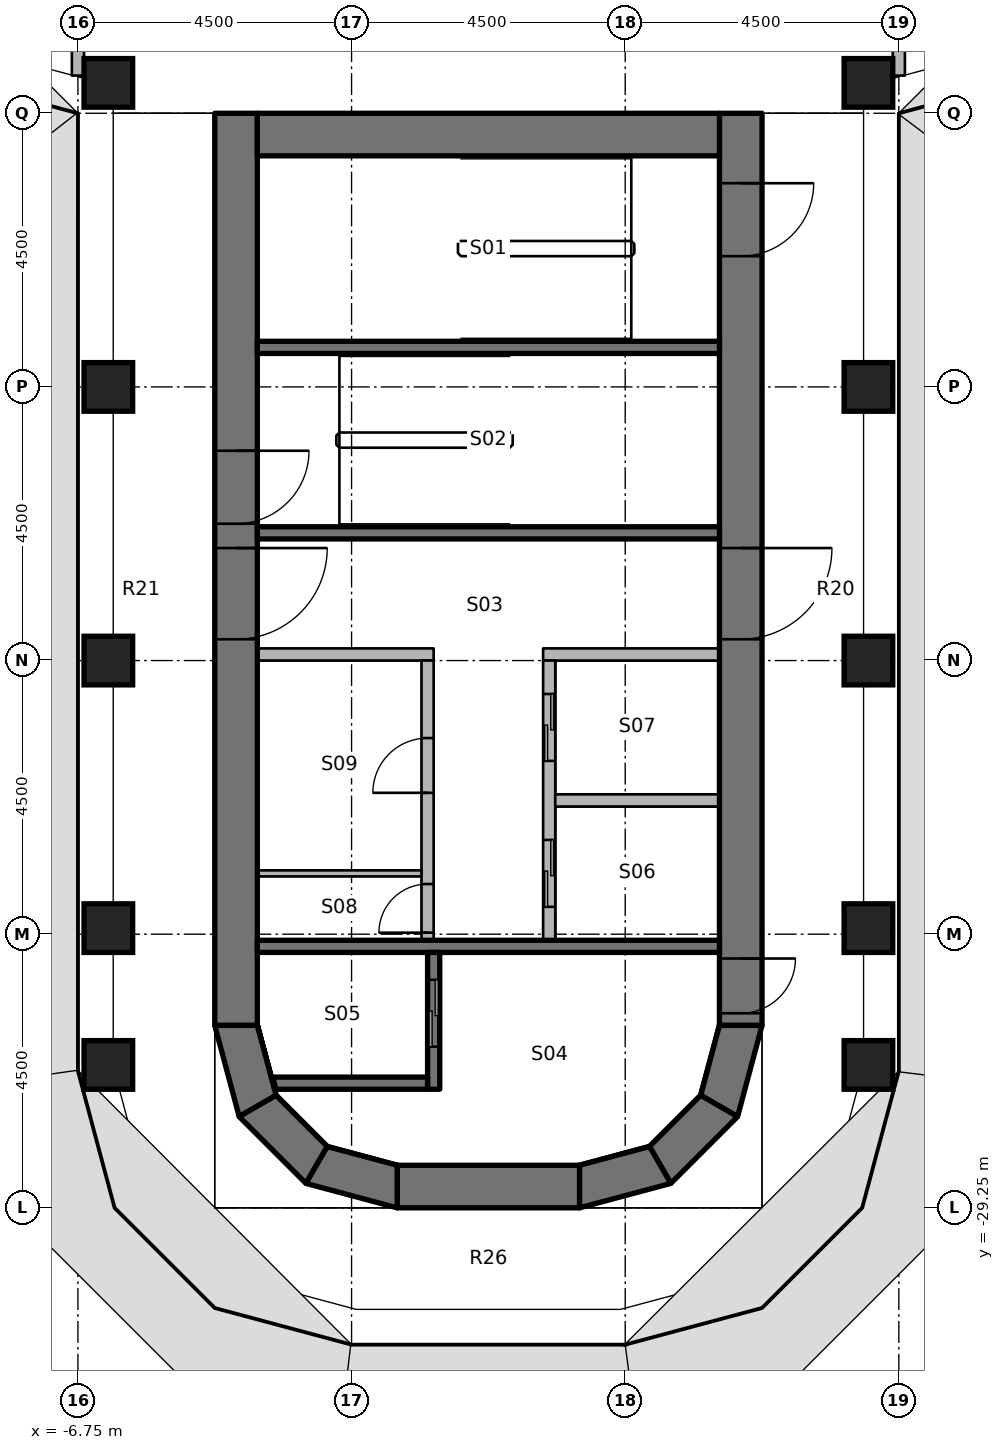
"""IFC4 building model, lengths in metres.
Left out: names, types, materials, properties, quantities, classifications, styles, units other than length and angle.
Written with IfcOpenShell. Run it as: python <this file> out.ifc"""

import sys

from ifc_helpers import new_model, si_unit, direction, frame, frame_2d, origin, origin_2d, place, context, subcontext, project, spatial, polyline, rectangle, outline, extrude, element, fill, save


model = new_model("IFC4")
c1 = context("Model", 3, precision=1e-05, world=origin(), true_north=direction((0.0, 1.0)))
c2 = subcontext(c1, "Body", "Model", "MODEL_VIEW")
j1 = project(units=[si_unit("LENGTHUNIT", "METRE"), si_unit("PLANEANGLEUNIT", "RADIAN")], contexts=[c1])
p1 = place(None, origin())
s1 = spatial("IfcSite", under=j1, at=p1, CompositionType="ELEMENT")
p2 = place(p1, origin())
s2 = spatial("IfcBuilding", under=s1, at=p2, CompositionType="ELEMENT")
p3 = place(p2, frame((0.0, 0.0, 179.0)))
s3 = spatial("IfcBuildingStorey", under=s2, at=p3, CompositionType="ELEMENT", Elevation=179.0)
for number, where, z_axis, x_axis in (
    (1, (-6.25, -26.9, 0.0), (0.0, 0.0, 1.0), (1.0, 0.0, 0.0)),
    (2, (-6.25, -24.65, 0.0), (0.0, 0.0, 1.0), (1.0, 0.0, 0.0)),
    (3, (-6.25, -20.25, 0.0), (0.0, 0.0, 1.0), (1.0, 0.0, 0.0)),
    (4, (-6.25, -15.75, 0.0), (0.0, 0.0, 1.0), (1.0, 0.0, 0.0)),
    (5, (-6.25, -10.75, 0.0), (0.0, 0.0, 1.0), (1.0, 0.0, 0.0)),
    (6, (6.25, -26.9, 0.0), (0.0, 0.0, 1.0), (1.0, 0.0, 0.0)),
    (7, (6.25, -24.65, 0.0), (0.0, 0.0, 1.0), (1.0, 0.0, 0.0)),
    (8, (6.25, -20.25, 0.0), (0.0, 0.0, 1.0), (1.0, 0.0, 0.0)),
    (9, (6.25, -15.75, 0.0), (0.0, 0.0, 1.0), (1.0, 0.0, 0.0)),
    (10, (6.25, -10.75, 0.0), (0.0, 0.0, 1.0), (1.0, 0.0, 0.0)),
):
    element("IfcColumn", number, at=place(p3, frame(where, z_axis=z_axis, x_axis=x_axis)), inside=s3, PredefinedType="COLUMN", context=c2, shape_type="SweptSolid", body=[
        extrude(rectangle(XDim=0.8, YDim=0.8, at=origin_2d()), origin(), (0.0, 0.0, 1.0), 3.65),
    ])
p4 = place(p3, frame((-4.15, -11.25, 0.0), z_axis=(0.0, 0.0, 1.0), x_axis=(0.0, -1.0, 0.0)))
e11 = element("IfcWall", 11, at=p4, inside=s3, PredefinedType="SHEAR", context=c2, shape_type="SweptSolid", body=[
    extrude(rectangle(XDim=15.0, YDim=0.7, at=frame_2d((7.5, 0.0))), origin(), (0.0, 0.0, 1.0), 3.8),
])
p5 = place(p4, frame((7.15, 0.0, 0.0)))
e12 = element("IfcOpeningElement", 12, at=p5, cuts=e11, PredefinedType="OPENING", context=c2, shape_type="SweptSolid", body=[
    extrude(rectangle(XDim=1.5, YDim=2.3, at=frame_2d((0.75, 1.15))), frame((0.0, 0.36, 0.0), z_axis=(0.0, -1.0, 0.0), x_axis=(1.0, 0.0, 0.0)), (0.0, 0.0, 1.0), 0.72),
])
p6 = place(p4, frame((5.55, 0.0, 0.0)))
e13 = element("IfcOpeningElement", 13, at=p6, cuts=e11, PredefinedType="OPENING", context=c2, shape_type="SweptSolid", body=[
    extrude(rectangle(XDim=1.2, YDim=2.1, at=frame_2d((0.6, 1.05))), frame((0.0, 0.36, 0.0), z_axis=(0.0, -1.0, 0.0), x_axis=(1.0, 0.0, 0.0)), (0.0, 0.0, 1.0), 0.72),
])
p7 = place(p3, frame((4.15, -11.25, 0.0), z_axis=(0.0, 0.0, 1.0), x_axis=(0.0, -1.0, 0.0)))
e14 = element("IfcWall", 14, at=p7, inside=s3, PredefinedType="SHEAR", context=c2, shape_type="SweptSolid", body=[
    extrude(rectangle(XDim=15.0, YDim=0.7, at=frame_2d((7.5, 0.0))), origin(), (0.0, 0.0, 1.0), 3.8),
])
p8 = place(p7, frame((7.15, 0.0, 0.0)))
e15 = element("IfcOpeningElement", 15, at=p8, cuts=e14, PredefinedType="OPENING", context=c2, shape_type="SweptSolid", body=[
    extrude(rectangle(XDim=1.5, YDim=2.3, at=frame_2d((0.75, 1.15))), frame((0.0, 0.36, 0.0), z_axis=(0.0, -1.0, 0.0), x_axis=(1.0, 0.0, 0.0)), (0.0, 0.0, 1.0), 0.72),
])
p9 = place(p7, frame((13.9, 0.0, 0.0)))
e16 = element("IfcOpeningElement", 16, at=p9, cuts=e14, PredefinedType="OPENING", context=c2, shape_type="SweptSolid", body=[
    extrude(rectangle(XDim=0.9, YDim=2.1, at=frame_2d((0.45, 1.05))), frame((0.0, 0.36, 0.0), z_axis=(0.0, -1.0, 0.0), x_axis=(1.0, 0.0, 0.0)), (0.0, 0.0, 1.0), 0.72),
])
p10 = place(p7, frame((1.15, 0.0, 0.0)))
e17 = element("IfcOpeningElement", 17, at=p10, cuts=e14, PredefinedType="OPENING", context=c2, shape_type="SweptSolid", body=[
    extrude(rectangle(XDim=1.2, YDim=2.1, at=frame_2d((0.6, 1.05))), frame((0.0, 0.36, 0.0), z_axis=(0.0, -1.0, 0.0), x_axis=(1.0, 0.0, 0.0)), (0.0, 0.0, 1.0), 0.72),
])
p11 = place(p3, frame((-3.8, -11.6, 0.0), z_axis=(0.0, 0.0, 1.0), x_axis=(1.0, 0.0, 0.0)))
e18 = element("IfcWall", 18, at=p11, inside=s3, PredefinedType="SHEAR", context=c2, shape_type="SweptSolid", body=[
    extrude(rectangle(XDim=7.6, YDim=0.7, at=frame_2d((3.8, 0.0))), origin(), (0.0, 0.0, 1.0), 3.8),
])
p12 = place(p3, frame((-1.5, -28.9, 0.0), z_axis=(0.0, 0.0, 1.0), x_axis=(1.0, 0.0, 0.0)))
e19 = element("IfcWall", 19, at=p12, inside=s3, PredefinedType="SHEAR", context=c2, shape_type="SweptSolid", body=[
    extrude(rectangle(XDim=3.0, YDim=0.7, at=frame_2d((1.5, 0.0))), origin(), (0.0, 0.0, 1.0), 3.8),
])
p13 = place(p3, origin())
e20 = element("IfcWall", 20, at=p13, inside=s3, PredefinedType="SHEAR", context=c2, shape_type="SweptSolid", body=[
    extrude(outline(polyline([(-4.5, -26.25), (-4.098, -27.75), (-3.492, -27.4), (-3.8, -26.25), (-4.5, -26.25)])), origin(), (0.0, 0.0, 1.0), 3.8),
])
p14 = place(p3, origin())
e21 = element("IfcWall", 21, at=p14, inside=s3, PredefinedType="SHEAR", context=c2, shape_type="SweptSolid", body=[
    extrude(outline(polyline([(-4.098, -27.75), (-3.0, -28.848), (-2.65, -28.242), (-3.492, -27.4), (-4.098, -27.75)])), origin(), (0.0, 0.0, 1.0), 3.8),
])
p15 = place(p3, origin())
e22 = element("IfcWall", 22, at=p15, inside=s3, PredefinedType="SHEAR", context=c2, shape_type="SweptSolid", body=[
    extrude(outline(polyline([(-3.0, -28.848), (-1.5, -29.25), (-1.5, -28.55), (-2.65, -28.242), (-3.0, -28.848)])), origin(), (0.0, 0.0, 1.0), 3.8),
])
p16 = place(p3, origin())
e23 = element("IfcWall", 23, at=p16, inside=s3, PredefinedType="SHEAR", context=c2, shape_type="SweptSolid", body=[
    extrude(outline(polyline([(4.5, -26.25), (4.098, -27.75), (3.492, -27.4), (3.8, -26.25), (4.5, -26.25)])), origin(), (0.0, 0.0, 1.0), 3.8),
])
p17 = place(p3, origin())
e24 = element("IfcWall", 24, at=p17, inside=s3, PredefinedType="SHEAR", context=c2, shape_type="SweptSolid", body=[
    extrude(outline(polyline([(4.098, -27.75), (3.0, -28.848), (2.65, -28.242), (3.492, -27.4), (4.098, -27.75)])), origin(), (0.0, 0.0, 1.0), 3.8),
])
p18 = place(p3, origin())
e25 = element("IfcWall", 25, at=p18, inside=s3, PredefinedType="SHEAR", context=c2, shape_type="SweptSolid", body=[
    extrude(outline(polyline([(3.0, -28.848), (1.5, -29.25), (1.5, -28.55), (2.65, -28.242), (3.0, -28.848)])), origin(), (0.0, 0.0, 1.0), 3.8),
])
p19 = place(p3, frame((3.8, -24.95, 0.0), z_axis=(0.0, 0.0, 1.0), x_axis=(-1.0, 0.0, 0.0)))
e26 = element("IfcWall", 26, at=p19, inside=s3, PredefinedType="SHEAR", context=c2, shape_type="SweptSolid", body=[
    extrude(rectangle(XDim=7.6, YDim=0.2, at=frame_2d((3.8, 0.0))), origin(), (0.0, 0.0, 1.0), 3.65),
])
p20 = place(p3, frame((-0.9, -27.3, 0.0), z_axis=(0.0, 0.0, 1.0), x_axis=(0.0, 1.0, 0.0)))
e27 = element("IfcWall", 27, at=p20, inside=s3, PredefinedType="SHEAR", context=c2, shape_type="SweptSolid", body=[
    extrude(rectangle(XDim=2.25, YDim=0.2, at=frame_2d((1.125, 0.0))), origin(), (0.0, 0.0, 1.0), 3.65),
])
p21 = place(p20, frame((0.7, 0.0, 0.0)))
e28 = element("IfcOpeningElement", 28, at=p21, cuts=e27, PredefinedType="OPENING", context=c2, shape_type="SweptSolid", body=[
    extrude(rectangle(XDim=1.1, YDim=2.3, at=frame_2d((0.55, 1.15))), frame((0.0, 0.11, 0.0), z_axis=(0.0, -1.0, 0.0), x_axis=(1.0, 0.0, 0.0)), (0.0, 0.0, 1.0), 0.22),
])
p22 = place(p3, origin())
e29 = element("IfcWall", 29, at=p22, inside=s3, PredefinedType="SHEAR", context=c2, shape_type="SweptSolid", body=[
    extrude(outline(polyline([(-1.0, -27.1), (-3.548, -27.1), (-3.494, -27.3), (-1.0, -27.3), (-1.0, -27.1)])), origin(), (0.0, 0.0, 1.0), 3.65),
])
for number, where, z_axis, x_axis in (
    (30, (3.8, -18.15, 0.0), (0.0, 0.0, 1.0), (-1.0, 0.0, 0.0)),
    (31, (3.8, -15.1, 0.0), (0.0, 0.0, 1.0), (-1.0, 0.0, 0.0)),
):
    element("IfcWall", number, at=place(p3, frame(where, z_axis=z_axis, x_axis=x_axis)), inside=s3, PredefinedType="SHEAR", context=c2, shape_type="SweptSolid", body=[
        extrude(rectangle(XDim=7.6, YDim=0.2, at=frame_2d((3.8, 0.0))), origin(), (0.0, 0.0, 1.0), 3.65),
    ])
p23 = place(p3, frame((3.8, -20.15, 0.0), z_axis=(0.0, 0.0, 1.0), x_axis=(-1.0, 0.0, 0.0)))
e32 = element("IfcWall", 32, at=p23, inside=s3, PredefinedType="PARTITIONING", context=c2, shape_type="SweptSolid", body=[
    extrude(rectangle(XDim=2.9, YDim=0.2, at=frame_2d((1.45, 0.0))), origin(), (0.0, 0.0, 1.0), 3.65),
])
p24 = place(p3, frame((1.0, -24.85, 0.0), z_axis=(0.0, 0.0, 1.0), x_axis=(0.0, 1.0, 0.0)))
e33 = element("IfcWall", 33, at=p24, inside=s3, PredefinedType="PARTITIONING", context=c2, shape_type="SweptSolid", body=[
    extrude(rectangle(XDim=4.6, YDim=0.2, at=frame_2d((2.3, 0.0))), origin(), (0.0, 0.0, 1.0), 3.65),
])
p25 = place(p24, frame((0.55, 0.0, 0.0)))
e34 = element("IfcOpeningElement", 34, at=p25, cuts=e33, PredefinedType="OPENING", context=c2, shape_type="SweptSolid", body=[
    extrude(rectangle(XDim=1.1, YDim=2.3, at=frame_2d((0.55, 1.15))), frame((0.0, 0.11, 0.0), z_axis=(0.0, -1.0, 0.0), x_axis=(1.0, 0.0, 0.0)), (0.0, 0.0, 1.0), 0.22),
])
p26 = place(p24, frame((2.95, 0.0, 0.0)))
e35 = element("IfcOpeningElement", 35, at=p26, cuts=e33, PredefinedType="OPENING", context=c2, shape_type="SweptSolid", body=[
    extrude(rectangle(XDim=1.1, YDim=2.3, at=frame_2d((0.55, 1.15))), frame((0.0, 0.11, 0.0), z_axis=(0.0, -1.0, 0.0), x_axis=(1.0, 0.0, 0.0)), (0.0, 0.0, 1.0), 0.22),
])
p27 = place(p3, frame((-0.9, -20.15, 0.0), z_axis=(0.0, 0.0, 1.0), x_axis=(-1.0, 0.0, 0.0)))
e36 = element("IfcWall", 36, at=p27, inside=s3, PredefinedType="PARTITIONING", context=c2, shape_type="SweptSolid", body=[
    extrude(rectangle(XDim=2.9, YDim=0.2, at=frame_2d((1.45, 0.0))), origin(), (0.0, 0.0, 1.0), 3.65),
])
p28 = place(p3, frame((-1.0, -24.85, 0.0), z_axis=(0.0, 0.0, 1.0), x_axis=(0.0, 1.0, 0.0)))
e37 = element("IfcWall", 37, at=p28, inside=s3, PredefinedType="PARTITIONING", context=c2, shape_type="SweptSolid", body=[
    extrude(rectangle(XDim=4.6, YDim=0.2, at=frame_2d((2.3, 0.0))), origin(), (0.0, 0.0, 1.0), 3.65),
])
p29 = place(p28, frame((0.125, 0.0, 0.0)))
e38 = element("IfcOpeningElement", 38, at=p29, cuts=e37, PredefinedType="OPENING", context=c2, shape_type="SweptSolid", body=[
    extrude(rectangle(XDim=0.8, YDim=2.1, at=frame_2d((0.4, 1.05))), frame((0.0, 0.11, 0.0), z_axis=(0.0, -1.0, 0.0), x_axis=(1.0, 0.0, 0.0)), (0.0, 0.0, 1.0), 0.22),
])
p30 = place(p28, frame((2.425, 0.0, 0.0)))
e39 = element("IfcOpeningElement", 39, at=p30, cuts=e37, PredefinedType="OPENING", context=c2, shape_type="SweptSolid", body=[
    extrude(rectangle(XDim=0.9, YDim=2.1, at=frame_2d((0.45, 1.05))), frame((0.0, 0.11, 0.0), z_axis=(0.0, -1.0, 0.0), x_axis=(1.0, 0.0, 0.0)), (0.0, 0.0, 1.0), 0.22),
])
p31 = place(p3, frame((3.8, -22.55, 0.0), z_axis=(0.0, 0.0, 1.0), x_axis=(-1.0, 0.0, 0.0)))
e40 = element("IfcWall", 40, at=p31, inside=s3, PredefinedType="PARTITIONING", context=c2, shape_type="SweptSolid", body=[
    extrude(rectangle(XDim=2.7, YDim=0.2, at=frame_2d((1.35, 0.0))), origin(), (0.0, 0.0, 1.0), 3.65),
])
p32 = place(p3, frame((-1.1, -23.75, 0.0), z_axis=(0.0, 0.0, 1.0), x_axis=(-1.0, 0.0, 0.0)))
e41 = element("IfcWall", 41, at=p32, inside=s3, PredefinedType="PARTITIONING", context=c2, shape_type="SweptSolid", body=[
    extrude(rectangle(XDim=2.7, YDim=0.1, at=frame_2d((1.35, 0.0))), origin(), (0.0, 0.0, 1.0), 3.65),
])
for number, where, z_axis, x_axis in (
    (42, (6.75, -10.63, 0.0), (0.0, 0.0, 1.0), (0.0, 1.0, 0.0)),
    (43, (-6.75, -10.63, 0.0), (0.0, 0.0, 1.0), (0.0, 1.0, 0.0)),
):
    element("IfcWall", number, at=place(p3, frame(where, z_axis=z_axis, x_axis=x_axis)), inside=s3, PredefinedType="PARTITIONING", context=c2, shape_type="SweptSolid", body=[
        extrude(rectangle(XDim=3.78, YDim=0.2, at=frame_2d((1.89, 0.0))), origin(), (0.0, 0.0, 1.0), 2.75),
    ])
p33 = place(p8, origin())
e44 = element("IfcDoor", 44, at=p33, inside=s3, OperationType="DOUBLE_DOOR_SINGLE_SWING", PredefinedType="DOOR", context=c2, shape_type="SweptSolid", body=[
    extrude(rectangle(XDim=1.5, YDim=2.3, at=frame_2d((0.75, 1.15))), frame((0.0, 0.025, 0.0), z_axis=(0.0, -1.0, 0.0), x_axis=(1.0, 0.0, 0.0)), (0.0, 0.0, 1.0), 0.05),
])
fill(e15, e44)
p34 = place(p5, origin())
e45 = element("IfcDoor", 45, at=p34, inside=s3, OperationType="DOUBLE_DOOR_SINGLE_SWING", PredefinedType="DOOR", context=c2, shape_type="SweptSolid", body=[
    extrude(rectangle(XDim=1.5, YDim=2.3, at=frame_2d((0.75, 1.15))), frame((0.0, 0.025, 0.0), z_axis=(0.0, -1.0, 0.0), x_axis=(1.0, 0.0, 0.0)), (0.0, 0.0, 1.0), 0.05),
])
fill(e12, e45)
p35 = place(p9, origin())
e46 = element("IfcDoor", 46, at=p35, inside=s3, OperationType="SINGLE_SWING_RIGHT", PredefinedType="DOOR", context=c2, shape_type="SweptSolid", body=[
    extrude(rectangle(XDim=0.9, YDim=2.1, at=frame_2d((0.45, 1.05))), frame((0.0, 0.025, 0.0), z_axis=(0.0, -1.0, 0.0), x_axis=(1.0, 0.0, 0.0)), (0.0, 0.0, 1.0), 0.05),
])
fill(e16, e46)
p36 = place(p6, origin())
e47 = element("IfcDoor", 47, at=p36, inside=s3, OperationType="SINGLE_SWING_RIGHT", PredefinedType="DOOR", context=c2, shape_type="SweptSolid", body=[
    extrude(rectangle(XDim=1.2, YDim=2.1, at=frame_2d((0.6, 1.05))), frame((0.0, 0.025, 0.0), z_axis=(0.0, -1.0, 0.0), x_axis=(1.0, 0.0, 0.0)), (0.0, 0.0, 1.0), 0.05),
])
fill(e13, e47)
p37 = place(p10, origin())
e48 = element("IfcDoor", 48, at=p37, inside=s3, OperationType="SINGLE_SWING_LEFT", PredefinedType="DOOR", context=c2, shape_type="SweptSolid", body=[
    extrude(rectangle(XDim=1.2, YDim=2.1, at=frame_2d((0.6, 1.05))), frame((0.0, 0.025, 0.0), z_axis=(0.0, -1.0, 0.0), x_axis=(1.0, 0.0, 0.0)), (0.0, 0.0, 1.0), 0.05),
])
fill(e17, e48)
p38 = place(p21, origin())
e49 = element("IfcDoor", 49, at=p38, inside=s3, OperationType="DOUBLE_DOOR_SLIDING", PredefinedType="DOOR", context=c2, shape_type="SweptSolid", body=[
    extrude(rectangle(XDim=1.1, YDim=2.3, at=frame_2d((0.55, 1.15))), frame((0.0, 0.025, 0.0), z_axis=(0.0, -1.0, 0.0), x_axis=(1.0, 0.0, 0.0)), (0.0, 0.0, 1.0), 0.05),
])
fill(e28, e49)
p39 = place(p25, origin())
e50 = element("IfcDoor", 50, at=p39, inside=s3, OperationType="DOUBLE_DOOR_SLIDING", PredefinedType="DOOR", context=c2, shape_type="SweptSolid", body=[
    extrude(rectangle(XDim=1.1, YDim=2.3, at=frame_2d((0.55, 1.15))), frame((0.0, 0.025, 0.0), z_axis=(0.0, -1.0, 0.0), x_axis=(1.0, 0.0, 0.0)), (0.0, 0.0, 1.0), 0.05),
])
fill(e34, e50)
p40 = place(p26, origin())
e51 = element("IfcDoor", 51, at=p40, inside=s3, OperationType="DOUBLE_DOOR_SLIDING", PredefinedType="DOOR", context=c2, shape_type="SweptSolid", body=[
    extrude(rectangle(XDim=1.1, YDim=2.3, at=frame_2d((0.55, 1.15))), frame((0.0, 0.025, 0.0), z_axis=(0.0, -1.0, 0.0), x_axis=(1.0, 0.0, 0.0)), (0.0, 0.0, 1.0), 0.05),
])
fill(e35, e51)
p41 = place(p29, origin())
e52 = element("IfcDoor", 52, at=p41, inside=s3, OperationType="SINGLE_SWING_RIGHT", PredefinedType="DOOR", context=c2, shape_type="SweptSolid", body=[
    extrude(rectangle(XDim=0.8, YDim=2.1, at=frame_2d((0.4, 1.05))), frame((0.0, 0.025, 0.0), z_axis=(0.0, -1.0, 0.0), x_axis=(1.0, 0.0, 0.0)), (0.0, 0.0, 1.0), 0.05),
])
fill(e38, e52)
p42 = place(p30, origin())
e53 = element("IfcDoor", 53, at=p42, inside=s3, OperationType="SINGLE_SWING_RIGHT", PredefinedType="DOOR", context=c2, shape_type="SweptSolid", body=[
    extrude(rectangle(XDim=0.9, YDim=2.1, at=frame_2d((0.45, 1.05))), frame((0.0, 0.025, 0.0), z_axis=(0.0, -1.0, 0.0), x_axis=(1.0, 0.0, 0.0)), (0.0, 0.0, 1.0), 0.05),
])
fill(e39, e53)
save(model, sys.argv[1])
